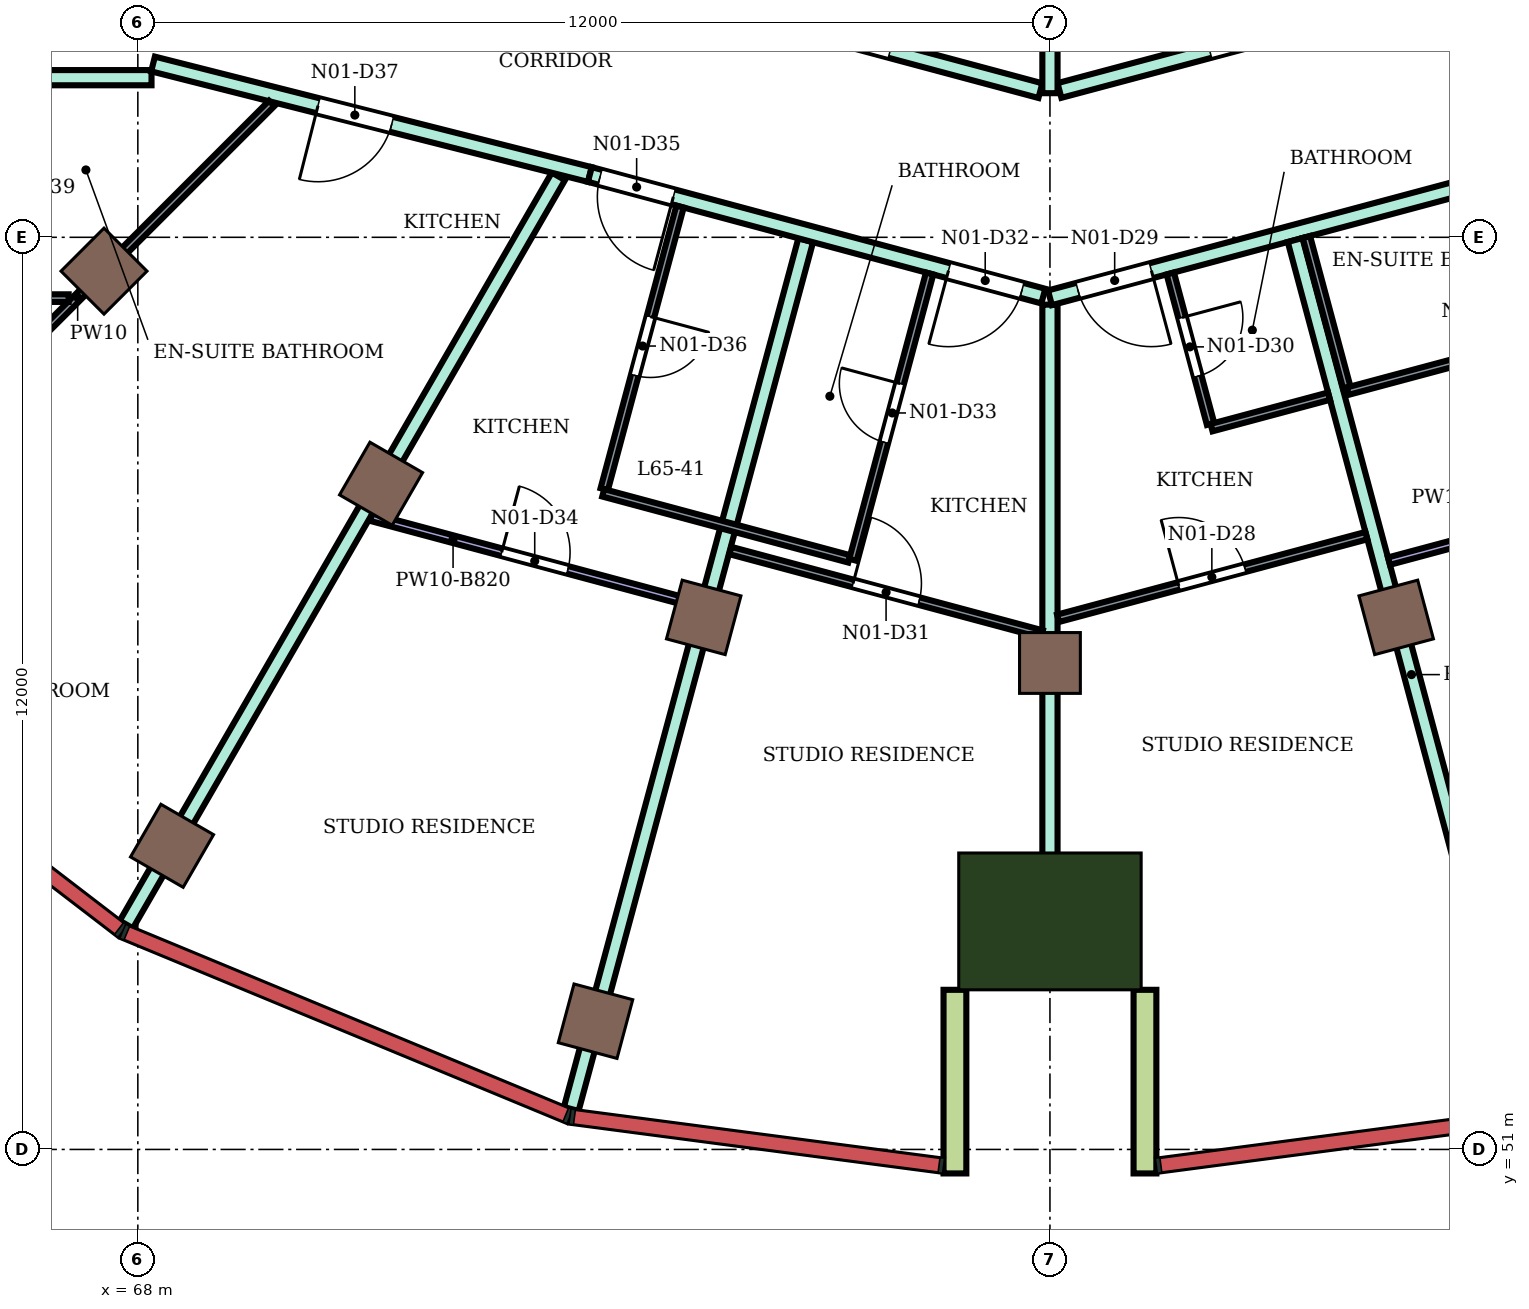
"""IFC4 building model, lengths in metres.
Left out: names, types, materials, properties, quantities, classifications, styles, units other than length and angle.
Written with IfcOpenShell. Run it as: python <this file> out.ifc"""

import sys

from ifc_helpers import new_model, si_unit, direction, frame, frame_2d, origin, origin_2d, place, context, subcontext, project, spatial, rectangle, extrude, element, fill, save


model = new_model("IFC4")
c1 = context("Model", 3, precision=1e-05, world=origin(), true_north=direction((0.0, 1.0)))
c2 = subcontext(c1, "Body", "Model", "MODEL_VIEW")
j1 = project(units=[si_unit("LENGTHUNIT", "METRE"), si_unit("PLANEANGLEUNIT", "RADIAN")], contexts=[c1])
p1 = place(None, origin())
s1 = spatial("IfcSite", under=j1, at=p1, CompositionType="ELEMENT")
p2 = place(p1, origin())
s2 = spatial("IfcBuilding", under=s1, at=p2, CompositionType="ELEMENT")
p3 = place(p2, frame((0.0, 0.0, 284.1)))
s3 = spatial("IfcBuildingStorey", under=s2, at=p3, CompositionType="ELEMENT", Elevation=284.1)
for number, where, z_axis, x_axis in (
    (1, (68.45, 54.995, 0.0), (0.0, 0.0, 1.0), (-0.5, -0.866, 0.0)),
    (2, (74.021, 52.687, 0.0), (0.0, 0.0, 1.0), (-0.259, -0.966, 0.0)),
    (3, (67.555, 62.555, 0.0), (0.0, 0.0, 1.0), (-0.707, -0.707, 0.0)),
    (4, (71.2, 59.758, 0.0), (0.0, 0.0, 1.0), (-0.5, -0.866, 0.0)),
    (5, (75.445, 58.0, 0.0), (0.0, 0.0, 1.0), (-0.259, -0.966, 0.0)),
    (6, (80.0, 57.4, 0.0), (0.0, 0.0, 1.0), (0.0, -1.0, 0.0)),
    (7, (84.555, 58.0, 0.0), (0.0, 0.0, 1.0), (0.259, -0.966, 0.0)),
):
    element("IfcColumn", number, at=place(p3, frame(where, z_axis=z_axis, x_axis=x_axis)), inside=s3, PredefinedType="COLUMN", context=c2, shape_type="SweptSolid", body=[
        extrude(rectangle(XDim=0.8, YDim=0.8, at=origin_2d()), origin(), (0.0, 0.0, 1.0), 4.2),
    ])
p4 = place(p3, frame((80.0, 54.0, 0.0), z_axis=(0.0, 0.0, 1.0), x_axis=(0.0, -1.0, 0.0)))
e8 = element("IfcColumn", 8, at=p4, inside=s3, PredefinedType="COLUMN", context=c2, shape_type="SweptSolid", body=[
    extrude(rectangle(XDim=1.8, YDim=2.4, at=origin_2d()), origin(), (0.0, 0.0, 1.0), 4.2),
])
for number, where, z_axis, x_axis in (
    (9, (78.75, 53.1, 0.0), (0.0, 0.0, 1.0), (0.0, -1.0, 0.0)),
    (10, (81.25, 53.1, 0.0), (0.0, 0.0, 1.0), (0.0, -1.0, 0.0)),
):
    element("IfcWall", number, at=place(p3, frame(where, z_axis=z_axis, x_axis=x_axis)), inside=s3, PredefinedType="NOTDEFINED", context=c2, shape_type="SweptSolid", body=[
        extrude(rectangle(XDim=2.416, YDim=0.3, at=frame_2d((1.208, 0.0))), origin(), (0.0, 0.0, 1.0), 4.2),
    ])
p5 = place(p3, frame((65.2, 65.1, 0.0), z_axis=(0.0, 0.0, 1.0), x_axis=(1.0, 0.0, 0.0)))
e11 = element("IfcWall", 11, at=p5, inside=s3, PredefinedType="PARTITIONING", context=c2, shape_type="SweptSolid", body=[
    extrude(rectangle(XDim=2.98, YDim=0.2, at=frame_2d((1.49, 0.0))), origin(), (0.0, 0.0, 1.0), 3.75),
])
p6 = place(p3, frame((67.848, 53.959, 0.0), z_axis=(0.0, 0.0, 1.0), x_axis=(0.500121565392, 0.865955206595, 0.0)))
e12 = element("IfcWall", 12, at=p6, inside=s3, PredefinedType="PARTITIONING", context=c2, shape_type="SweptSolid", body=[
    extrude(rectangle(XDim=11.366, YDim=0.2, at=frame_2d((5.683, 0.0))), origin(), (0.0, 0.0, 1.0), 3.75),
])
p7 = place(p3, frame((68.2, 65.28, 0.0), z_axis=(0.0, 0.0, 1.0), x_axis=(0.969440802773, -0.24532535523, 0.0)))
e13 = element("IfcWall", 13, at=p7, inside=s3, PredefinedType="PARTITIONING", context=c2, shape_type="SweptSolid", body=[
    extrude(rectangle(XDim=5.928, YDim=0.2, at=frame_2d((2.964, 0.0))), origin(), (0.0, 0.0, 1.0), 3.75),
])
p8 = place(p7, frame((2.239, 0.0, 0.0)))
e14 = element("IfcOpeningElement", 14, at=p8, cuts=e13, PredefinedType="OPENING", context=c2, shape_type="SweptSolid", body=[
    extrude(rectangle(XDim=1.0, YDim=2.1, at=frame_2d((0.5, 1.05))), frame((0.0, 0.11, 0.0), z_axis=(0.0, -1.0, 0.0), x_axis=(1.0, 0.0, 0.0)), (0.0, 0.0, 1.0), 0.22),
])
p9 = place(p3, frame((73.702, 51.532, 0.0), z_axis=(0.0, 0.0, 1.0), x_axis=(0.2605791587, 0.965452485652, 0.0)))
e15 = element("IfcWall", 15, at=p9, inside=s3, PredefinedType="PARTITIONING", context=c2, shape_type="SweptSolid", body=[
    extrude(rectangle(XDim=11.838, YDim=0.2, at=frame_2d((5.919, 0.0))), origin(), (0.0, 0.0, 1.0), 3.75),
])
p10 = place(p3, frame((73.947, 63.826, 0.0), z_axis=(0.0, 0.0, 1.0), x_axis=(0.965872508768, -0.25901794688, 0.0)))
e16 = element("IfcWall", 16, at=p10, inside=s3, PredefinedType="PARTITIONING", context=c2, shape_type="SweptSolid", body=[
    extrude(rectangle(XDim=6.177, YDim=0.2, at=frame_2d((3.088, 0.0))), origin(), (0.0, 0.0, 1.0), 3.75),
])
p11 = place(p10, frame((4.885, 0.0, 0.0)))
e17 = element("IfcOpeningElement", 17, at=p11, cuts=e16, PredefinedType="OPENING", context=c2, shape_type="SweptSolid", body=[
    extrude(rectangle(XDim=1.0, YDim=2.1, at=frame_2d((0.5, 1.05))), frame((0.0, 0.11, 0.0), z_axis=(0.0, -1.0, 0.0), x_axis=(1.0, 0.0, 0.0)), (0.0, 0.0, 1.0), 0.22),
])
p12 = place(p10, frame((0.137, 0.0, 0.0)))
e18 = element("IfcOpeningElement", 18, at=p12, cuts=e16, PredefinedType="OPENING", context=c2, shape_type="SweptSolid", body=[
    extrude(rectangle(XDim=1.0, YDim=2.1, at=frame_2d((0.5, 1.05))), frame((0.0, 0.11, 0.0), z_axis=(0.0, -1.0, 0.0), x_axis=(1.0, 0.0, 0.0)), (0.0, 0.0, 1.0), 0.22),
])
p13 = place(p3, frame((74.603, 66.342, 0.0), z_axis=(0.0, 0.0, 1.0), x_axis=(0.965920893652, -0.258837453254, 0.0)))
e19 = element("IfcWall", 19, at=p13, inside=s3, PredefinedType="PARTITIONING", context=c2, shape_type="SweptSolid", body=[
    extrude(rectangle(XDim=5.458, YDim=0.2, at=frame_2d((2.729, 0.0))), origin(), (0.0, 0.0, 1.0), 3.75),
])
p14 = place(p13, frame((2.512, 0.0, 0.0)))
e20 = element("IfcOpeningElement", 20, at=p14, cuts=e19, PredefinedType="OPENING", context=c2, shape_type="SweptSolid", body=[
    extrude(rectangle(XDim=0.9, YDim=2.1, at=frame_2d((0.45, 1.05))), frame((0.0, 0.11, 0.0), z_axis=(0.0, -1.0, 0.0), x_axis=(1.0, 0.0, 0.0)), (0.0, 0.0, 1.0), 0.22),
])
p15 = place(p3, frame((80.125, 64.932, 0.0), z_axis=(0.0, 0.0, 1.0), x_axis=(0.966236955806, 0.257655089674, 0.0)))
e21 = element("IfcWall", 21, at=p15, inside=s3, PredefinedType="PARTITIONING", context=c2, shape_type="SweptSolid", body=[
    extrude(rectangle(XDim=8.039, YDim=0.2, at=frame_2d((4.02, 0.0))), origin(), (0.0, 0.0, 1.0), 3.75),
])
p16 = place(p15, frame((6.298, 0.0, 0.0)))
e22 = element("IfcOpeningElement", 22, at=p16, cuts=e21, PredefinedType="OPENING", context=c2, shape_type="SweptSolid", body=[
    extrude(rectangle(XDim=0.9, YDim=2.1, at=frame_2d((0.45, 1.05))), frame((0.0, 0.11, 0.0), z_axis=(0.0, -1.0, 0.0), x_axis=(1.0, 0.0, 0.0)), (0.0, 0.0, 1.0), 0.22),
])
p17 = place(p15, frame((2.045, 0.0, 0.0)))
e23 = element("IfcOpeningElement", 23, at=p17, cuts=e21, PredefinedType="OPENING", context=c2, shape_type="SweptSolid", body=[
    extrude(rectangle(XDim=0.9, YDim=2.1, at=frame_2d((0.45, 1.05))), frame((0.0, 0.11, 0.0), z_axis=(0.0, -1.0, 0.0), x_axis=(1.0, 0.0, 0.0)), (0.0, 0.0, 1.0), 0.22),
])
p18 = place(p3, frame((80.0, 53.3, 0.0), z_axis=(0.0, 0.0, 1.0), x_axis=(0.0, 1.0, 0.0)))
e24 = element("IfcWall", 24, at=p18, inside=s3, PredefinedType="PARTITIONING", context=c2, shape_type="SweptSolid", body=[
    extrude(rectangle(XDim=8.814, YDim=0.2, at=frame_2d((4.407, 0.0))), origin(), (0.0, 0.0, 1.0), 3.75),
])
p19 = place(p3, frame((80.0, 62.204, 0.0), z_axis=(0.0, 0.0, 1.0), x_axis=(0.965960221635, 0.258690645788, 0.0)))
e25 = element("IfcWall", 25, at=p19, inside=s3, PredefinedType="PARTITIONING", context=c2, shape_type="SweptSolid", body=[
    extrude(rectangle(XDim=6.267, YDim=0.2, at=frame_2d((3.133, 0.0))), origin(), (0.0, 0.0, 1.0), 3.75),
])
p20 = place(p19, frame((0.382, 0.0, 0.0)))
e26 = element("IfcOpeningElement", 26, at=p20, cuts=e25, PredefinedType="OPENING", context=c2, shape_type="SweptSolid", body=[
    extrude(rectangle(XDim=1.0, YDim=2.1, at=frame_2d((0.5, 1.05))), frame((0.0, 0.11, 0.0), z_axis=(0.0, -1.0, 0.0), x_axis=(1.0, 0.0, 0.0)), (0.0, 0.0, 1.0), 0.22),
])
p21 = place(p3, frame((80.0, 64.896, 0.0), z_axis=(0.0, 0.0, 1.0), x_axis=(0.0, 1.0, 0.0)))
e27 = element("IfcWall", 27, at=p21, inside=s3, PredefinedType="PARTITIONING", context=c2, shape_type="SweptSolid", body=[
    extrude(rectangle(XDim=2.405, YDim=0.2, at=frame_2d((1.203, 0.0))), origin(), (0.0, 0.0, 1.0), 3.75),
])
p22 = place(p3, frame((83.225, 62.965, 0.0), z_axis=(0.0, 0.0, 1.0), x_axis=(0.258656021451, -0.965969493601, 0.0)))
e28 = element("IfcWall", 28, at=p22, inside=s3, PredefinedType="PARTITIONING", context=c2, shape_type="SweptSolid", body=[
    extrude(rectangle(XDim=11.838, YDim=0.2, at=frame_2d((5.919, 0.0))), origin(), (0.0, 0.0, 1.0), 3.75),
])
p23 = place(p3, frame((64.656, 59.656, 0.0), z_axis=(0.0, 0.0, 1.0), x_axis=(0.707106781187, 0.707106781187, 0.0)))
e29 = element("IfcWall", 29, at=p23, inside=s3, PredefinedType="PARTITIONING", context=c2, shape_type="SweptSolid", body=[
    extrude(rectangle(XDim=7.22, YDim=0.1, at=frame_2d((3.61, 0.0))), origin(), (0.0, 0.0, 1.0), 3.75),
])
p24 = place(p23, frame((1.684, 0.0, 0.0)))
e30 = element("IfcOpeningElement", 30, at=p24, cuts=e29, PredefinedType="OPENING", context=c2, shape_type="SweptSolid", body=[
    extrude(rectangle(XDim=0.9, YDim=2.1, at=frame_2d((0.45, 1.05))), frame((0.0, 0.06, 0.0), z_axis=(0.0, -1.0, 0.0), x_axis=(1.0, 0.0, 0.0)), (0.0, 0.0, 1.0), 0.12),
])
p25 = place(p3, frame((65.8, 62.2, 0.0), z_axis=(0.0, 0.0, 1.0), x_axis=(1.0, 0.0, 0.0)))
e31 = element("IfcWall", 31, at=p25, inside=s3, PredefinedType="PARTITIONING", context=c2, shape_type="SweptSolid", body=[
    extrude(rectangle(XDim=1.29, YDim=0.1, at=frame_2d((0.645, 0.0))), origin(), (0.0, 0.0, 1.0), 3.75),
])
p26 = place(p3, frame((71.068, 59.317, 0.0), z_axis=(0.0, 0.0, 1.0), x_axis=(0.965923173799, -0.258828944127, 0.0)))
e32 = element("IfcWall", 32, at=p26, inside=s3, PredefinedType="PARTITIONING", context=c2, shape_type="SweptSolid", body=[
    extrude(rectangle(XDim=4.468, YDim=0.1, at=frame_2d((2.234, 0.0))), origin(), (0.0, 0.0, 1.0), 3.38),
])
p27 = place(p26, frame((1.779, 0.0, 0.0)))
e33 = element("IfcOpeningElement", 33, at=p27, cuts=e32, PredefinedType="OPENING", context=c2, shape_type="SweptSolid", body=[
    extrude(rectangle(XDim=0.9, YDim=2.1, at=frame_2d((0.45, 1.05))), frame((0.0, 0.06, 0.0), z_axis=(0.0, -1.0, 0.0), x_axis=(1.0, 0.0, 0.0)), (0.0, 0.0, 1.0), 0.12),
])
p28 = place(p3, frame((74.136, 59.686, 0.0), z_axis=(0.0, 0.0, 1.0), x_axis=(0.259020336752, 0.965871867873, 0.0)))
e34 = element("IfcWall", 34, at=p28, inside=s3, PredefinedType="PARTITIONING", context=c2, shape_type="SweptSolid", body=[
    extrude(rectangle(XDim=3.849, YDim=0.1, at=frame_2d((1.925, 0.0))), origin(), (0.0, 0.0, 1.0), 3.75),
])
p29 = place(p28, frame((1.55, 0.0, 0.0)))
e35 = element("IfcOpeningElement", 35, at=p29, cuts=e34, PredefinedType="OPENING", context=c2, shape_type="SweptSolid", body=[
    extrude(rectangle(XDim=0.8, YDim=2.1, at=frame_2d((0.4, 1.05))), frame((0.0, 0.06, 0.0), z_axis=(0.0, -1.0, 0.0), x_axis=(1.0, 0.0, 0.0)), (0.0, 0.0, 1.0), 0.12),
])
p30 = place(p3, frame((74.123, 59.638, 0.0), z_axis=(0.0, 0.0, 1.0), x_axis=(0.965820152698, -0.259213102761, 0.0)))
e36 = element("IfcWall", 36, at=p30, inside=s3, PredefinedType="PARTITIONING", context=c2, shape_type="SweptSolid", body=[
    extrude(rectangle(XDim=3.351, YDim=0.1, at=frame_2d((1.676, 0.0))), origin(), (0.0, 0.0, 1.0), 3.75),
])
p31 = place(p3, frame((75.795, 58.879, 0.0), z_axis=(0.0, 0.0, 1.0), x_axis=(0.965895141847, -0.258933533857, 0.0)))
e37 = element("IfcWall", 37, at=p31, inside=s3, PredefinedType="PARTITIONING", context=c2, shape_type="SweptSolid", body=[
    extrude(rectangle(XDim=4.244, YDim=0.1, at=frame_2d((2.122, 0.0))), origin(), (0.0, 0.0, 1.0), 3.75),
])
p32 = place(p31, frame((1.672, 0.0, 0.0)))
e38 = element("IfcOpeningElement", 38, at=p32, cuts=e37, PredefinedType="OPENING", context=c2, shape_type="SweptSolid", body=[
    extrude(rectangle(XDim=0.9, YDim=2.1, at=frame_2d((0.45, 1.05))), frame((0.0, 0.06, 0.0), z_axis=(0.0, -1.0, 0.0), x_axis=(1.0, 0.0, 0.0)), (0.0, 0.0, 1.0), 0.12),
])
p33 = place(p3, frame((77.408, 58.757, 0.0), z_axis=(0.0, 0.0, 1.0), x_axis=(0.258718354301, 0.965952800683, 0.0)))
e39 = element("IfcWall", 39, at=p33, inside=s3, PredefinedType="PARTITIONING", context=c2, shape_type="SweptSolid", body=[
    extrude(rectangle(XDim=3.9, YDim=0.1, at=frame_2d((1.95, 0.0))), origin(), (0.0, 0.0, 1.0), 3.75),
])
p34 = place(p33, frame((1.6, 0.0, 0.0)))
e40 = element("IfcOpeningElement", 40, at=p34, cuts=e39, PredefinedType="OPENING", context=c2, shape_type="SweptSolid", body=[
    extrude(rectangle(XDim=0.8, YDim=2.1, at=frame_2d((0.4, 1.05))), frame((0.0, 0.06, 0.0), z_axis=(0.0, -1.0, 0.0), x_axis=(1.0, 0.0, 0.0)), (0.0, 0.0, 1.0), 0.12),
])
p35 = place(p3, frame((80.106, 57.988, 0.0), z_axis=(0.0, 0.0, 1.0), x_axis=(0.965893555682, 0.25893945063, 0.0)))
e41 = element("IfcWall", 41, at=p35, inside=s3, PredefinedType="PARTITIONING", context=c2, shape_type="SweptSolid", body=[
    extrude(rectangle(XDim=4.2, YDim=0.1, at=frame_2d((2.1, 0.0))), origin(), (0.0, 0.0, 1.0), 3.75),
])
p36 = place(p35, frame((1.645, 0.0, 0.0)))
e42 = element("IfcOpeningElement", 42, at=p36, cuts=e41, PredefinedType="OPENING", context=c2, shape_type="SweptSolid", body=[
    extrude(rectangle(XDim=0.9, YDim=2.1, at=frame_2d((0.45, 1.05))), frame((0.0, 0.06, 0.0), z_axis=(0.0, -1.0, 0.0), x_axis=(1.0, 0.0, 0.0)), (0.0, 0.0, 1.0), 0.12),
])
p37 = place(p3, frame((81.583, 62.524, 0.0), z_axis=(0.0, 0.0, 1.0), x_axis=(0.258559472989, -0.965995341049, 0.0)))
e43 = element("IfcWall", 43, at=p37, inside=s3, PredefinedType="PARTITIONING", context=c2, shape_type="SweptSolid", body=[
    extrude(rectangle(XDim=2.05, YDim=0.1, at=frame_2d((1.025, 0.0))), origin(), (0.0, 0.0, 1.0), 3.75),
])
p38 = place(p37, frame((0.6, 0.0, 0.0)))
e44 = element("IfcOpeningElement", 44, at=p38, cuts=e43, PredefinedType="OPENING", context=c2, shape_type="SweptSolid", body=[
    extrude(rectangle(XDim=0.8, YDim=2.1, at=frame_2d((0.4, 1.05))), frame((0.0, 0.06, 0.0), z_axis=(0.0, -1.0, 0.0), x_axis=(1.0, 0.0, 0.0)), (0.0, 0.0, 1.0), 0.12),
])
p39 = place(p3, frame((82.126, 60.496, 0.0), z_axis=(0.0, 0.0, 1.0), x_axis=(0.965930342518, 0.258802189717, 0.0)))
e45 = element("IfcWall", 45, at=p39, inside=s3, PredefinedType="PARTITIONING", context=c2, shape_type="SweptSolid", body=[
    extrude(rectangle(XDim=1.6, YDim=0.1, at=frame_2d((0.8, 0.0))), origin(), (0.0, 0.0, 1.0), 3.75),
])
p40 = place(p3, frame((83.374, 63.004, 0.0), z_axis=(0.0, 0.0, 1.0), x_axis=(0.259144823933, -0.965838475227, 0.0)))
e46 = element("IfcWall", 46, at=p40, inside=s3, PredefinedType="PARTITIONING", context=c2, shape_type="SweptSolid", body=[
    extrude(rectangle(XDim=2.05, YDim=0.1, at=frame_2d((1.025, 0.0))), origin(), (0.0, 0.0, 1.0), 3.75),
])
p41 = place(p3, frame((83.918, 60.976, 0.0), z_axis=(0.0, 0.0, 1.0), x_axis=(0.965914351064, 0.258861867428, 0.0)))
e47 = element("IfcWall", 47, at=p41, inside=s3, PredefinedType="PARTITIONING", context=c2, shape_type="SweptSolid", body=[
    extrude(rectangle(XDim=3.687, YDim=0.1, at=frame_2d((1.843, 0.0))), origin(), (0.0, 0.0, 1.0), 3.75),
])
p42 = place(p41, frame((1.473, 0.0, 0.0)))
e48 = element("IfcOpeningElement", 48, at=p42, cuts=e47, PredefinedType="OPENING", context=c2, shape_type="SweptSolid", body=[
    extrude(rectangle(XDim=0.8, YDim=2.1, at=frame_2d((0.4, 1.05))), frame((0.0, 0.06, 0.0), z_axis=(0.0, -1.0, 0.0), x_axis=(1.0, 0.0, 0.0)), (0.0, 0.0, 1.0), 0.12),
])
p43 = place(p3, frame((84.461, 58.74, 0.0), z_axis=(0.0, 0.0, 1.0), x_axis=(0.965893774063, 0.258938636026, 0.0)))
e49 = element("IfcWall", 49, at=p43, inside=s3, PredefinedType="PARTITIONING", context=c2, shape_type="SweptSolid", body=[
    extrude(rectangle(XDim=4.358, YDim=0.1, at=frame_2d((2.179, 0.0))), origin(), (0.0, 0.0, 1.0), 3.38),
])
p44 = place(p43, frame((1.759, 0.0, 0.0)))
e50 = element("IfcOpeningElement", 50, at=p44, cuts=e49, PredefinedType="OPENING", context=c2, shape_type="SweptSolid", body=[
    extrude(rectangle(XDim=0.8, YDim=2.1, at=frame_2d((0.4, 1.05))), frame((0.0, 0.06, 0.0), z_axis=(0.0, -1.0, 0.0), x_axis=(1.0, 0.0, 0.0)), (0.0, 0.0, 1.0), 0.12),
])
p45 = place(p36, origin())
e51 = element("IfcDoor", 51, at=p45, inside=s3, OperationType="SINGLE_SWING_LEFT", PredefinedType="DOOR", context=c2, shape_type="SweptSolid", body=[
    extrude(rectangle(XDim=0.9, YDim=2.1, at=frame_2d((0.45, 1.05))), frame((0.0, 0.025, 0.0), z_axis=(0.0, -1.0, 0.0), x_axis=(1.0, 0.0, 0.0)), (0.0, 0.0, 1.0), 0.05),
])
fill(e42, e51)
p46 = place(p20, frame((1.0, 0.0, 0.0), z_axis=(0.0, 0.0, 1.0), x_axis=(-1.0, 0.0, 0.0)))
e52 = element("IfcDoor", 52, at=p46, inside=s3, OperationType="SINGLE_SWING_LEFT", PredefinedType="DOOR", context=c2, shape_type="SweptSolid", body=[
    extrude(rectangle(XDim=1.0, YDim=2.1, at=frame_2d((0.5, 1.05))), frame((0.0, 0.025, 0.0), z_axis=(0.0, -1.0, 0.0), x_axis=(1.0, 0.0, 0.0)), (0.0, 0.0, 1.0), 0.05),
])
fill(e26, e52)
p47 = place(p38, origin())
e53 = element("IfcDoor", 53, at=p47, inside=s3, OperationType="SINGLE_SWING_LEFT", PredefinedType="DOOR", context=c2, shape_type="SweptSolid", body=[
    extrude(rectangle(XDim=0.8, YDim=2.1, at=frame_2d((0.4, 1.05))), frame((0.0, 0.025, 0.0), z_axis=(0.0, -1.0, 0.0), x_axis=(1.0, 0.0, 0.0)), (0.0, 0.0, 1.0), 0.05),
])
fill(e44, e53)
p48 = place(p32, origin())
e54 = element("IfcDoor", 54, at=p48, inside=s3, OperationType="SINGLE_SWING_LEFT", PredefinedType="DOOR", context=c2, shape_type="SweptSolid", body=[
    extrude(rectangle(XDim=0.9, YDim=2.1, at=frame_2d((0.45, 1.05))), frame((0.0, 0.025, 0.0), z_axis=(0.0, -1.0, 0.0), x_axis=(1.0, 0.0, 0.0)), (0.0, 0.0, 1.0), 0.05),
])
fill(e38, e54)
p49 = place(p11, frame((1.0, 0.0, 0.0), z_axis=(0.0, 0.0, 1.0), x_axis=(-1.0, 0.0, 0.0)))
e55 = element("IfcDoor", 55, at=p49, inside=s3, OperationType="SINGLE_SWING_RIGHT", PredefinedType="DOOR", context=c2, shape_type="SweptSolid", body=[
    extrude(rectangle(XDim=1.0, YDim=2.1, at=frame_2d((0.5, 1.05))), frame((0.0, 0.025, 0.0), z_axis=(0.0, -1.0, 0.0), x_axis=(1.0, 0.0, 0.0)), (0.0, 0.0, 1.0), 0.05),
])
fill(e17, e55)
p50 = place(p34, origin())
e56 = element("IfcDoor", 56, at=p50, inside=s3, OperationType="SINGLE_SWING_RIGHT", PredefinedType="DOOR", context=c2, shape_type="SweptSolid", body=[
    extrude(rectangle(XDim=0.8, YDim=2.1, at=frame_2d((0.4, 1.05))), frame((0.0, 0.025, 0.0), z_axis=(0.0, -1.0, 0.0), x_axis=(1.0, 0.0, 0.0)), (0.0, 0.0, 1.0), 0.05),
])
fill(e40, e56)
p51 = place(p27, origin())
e57 = element("IfcDoor", 57, at=p51, inside=s3, OperationType="SINGLE_SWING_LEFT", PredefinedType="DOOR", context=c2, shape_type="SweptSolid", body=[
    extrude(rectangle(XDim=0.9, YDim=2.1, at=frame_2d((0.45, 1.05))), frame((0.0, 0.025, 0.0), z_axis=(0.0, -1.0, 0.0), x_axis=(1.0, 0.0, 0.0)), (0.0, 0.0, 1.0), 0.05),
])
fill(e33, e57)
p52 = place(p12, frame((1.0, 0.0, 0.0), z_axis=(0.0, 0.0, 1.0), x_axis=(-1.0, 0.0, 0.0)))
e58 = element("IfcDoor", 58, at=p52, inside=s3, OperationType="SINGLE_SWING_LEFT", PredefinedType="DOOR", context=c2, shape_type="SweptSolid", body=[
    extrude(rectangle(XDim=1.0, YDim=2.1, at=frame_2d((0.5, 1.05))), frame((0.0, 0.025, 0.0), z_axis=(0.0, -1.0, 0.0), x_axis=(1.0, 0.0, 0.0)), (0.0, 0.0, 1.0), 0.05),
])
fill(e18, e58)
p53 = place(p29, frame((0.8, 0.0, 0.0), z_axis=(0.0, 0.0, 1.0), x_axis=(-1.0, 0.0, 0.0)))
e59 = element("IfcDoor", 59, at=p53, inside=s3, OperationType="SINGLE_SWING_LEFT", PredefinedType="DOOR", context=c2, shape_type="SweptSolid", body=[
    extrude(rectangle(XDim=0.8, YDim=2.1, at=frame_2d((0.4, 1.05))), frame((0.0, 0.025, 0.0), z_axis=(0.0, -1.0, 0.0), x_axis=(1.0, 0.0, 0.0)), (0.0, 0.0, 1.0), 0.05),
])
fill(e35, e59)
p54 = place(p8, frame((1.0, 0.0, 0.0), z_axis=(0.0, 0.0, 1.0), x_axis=(-1.0, 0.0, 0.0)))
e60 = element("IfcDoor", 60, at=p54, inside=s3, OperationType="SINGLE_SWING_RIGHT", PredefinedType="DOOR", context=c2, shape_type="SweptSolid", body=[
    extrude(rectangle(XDim=1.0, YDim=2.1, at=frame_2d((0.5, 1.05))), frame((0.0, 0.025, 0.0), z_axis=(0.0, -1.0, 0.0), x_axis=(1.0, 0.0, 0.0)), (0.0, 0.0, 1.0), 0.05),
])
fill(e14, e60)
save(model, sys.argv[1])
